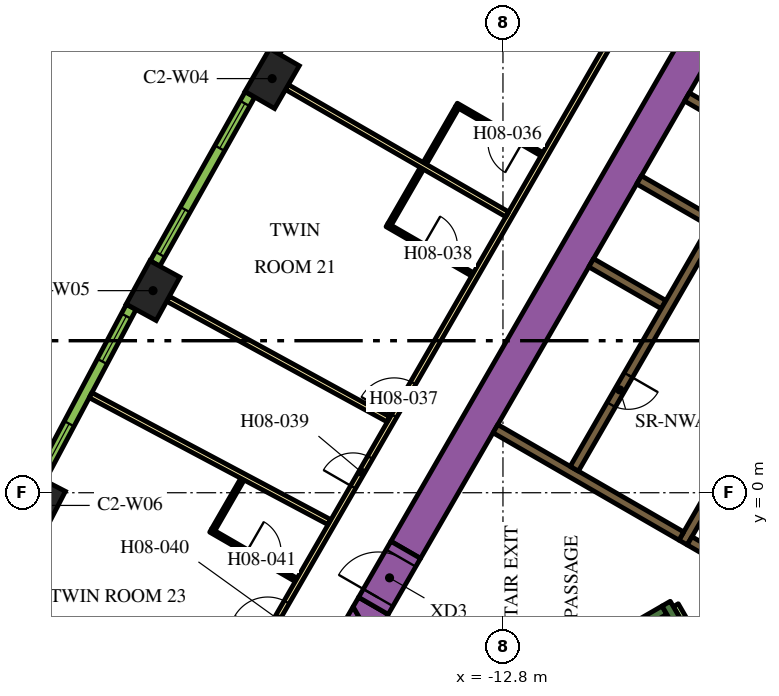
"""IFC4 building model, lengths in metres.
Left out: names, types, materials, properties, quantities, classifications, styles, units other than length and angle.
Written with IfcOpenShell. Run it as: python <this file> out.ifc"""

import sys

from ifc_helpers import new_model, si_unit, direction, frame, frame_2d, origin, origin_2d, place, context, subcontext, project, spatial, polyline, rectangle, outline, extrude, element, fill, save


model = new_model("IFC4")
c1 = context("Model", 3, precision=1e-05, world=origin(), true_north=direction((0.0, 1.0)))
c2 = subcontext(c1, "Body", "Model", "MODEL_VIEW")
j1 = project(units=[si_unit("LENGTHUNIT", "METRE"), si_unit("PLANEANGLEUNIT", "RADIAN")], contexts=[c1])
p1 = place(None, origin())
s1 = spatial("IfcSite", under=j1, at=p1, CompositionType="ELEMENT")
p2 = place(p1, origin())
s2 = spatial("IfcBuilding", under=s1, at=p2, CompositionType="ELEMENT")
p3 = place(p2, frame((0.0, 0.0, 111.0)))
s3 = spatial("IfcBuildingStorey", under=s2, at=p3, CompositionType="ELEMENT", Elevation=111.0)
for number, where, z_axis, x_axis in (
    (1, (-18.874, 10.897, 0.0), (0.0, 0.0, 1.0), (-0.5, -0.866, 0.0)),
    (2, (-22.009, 5.317, 0.0), (0.0, 0.0, 1.0), (-0.48, -0.877, 0.0)),
    (3, (-25.012, -0.334, 0.0), (0.0, 0.0, 1.0), (-0.459, -0.888, 0.0)),
):
    element("IfcColumn", number, at=place(p3, frame(where, z_axis=z_axis, x_axis=x_axis)), inside=s3, PredefinedType="COLUMN", context=c2, shape_type="SweptSolid", body=[
        extrude(rectangle(XDim=1.3, YDim=0.9, at=origin_2d()), origin(), (0.0, 0.0, 1.0), 3.9),
    ])
p4 = place(p3, frame((-15.36, -1.503, 0.0), z_axis=(0.0, 0.0, 1.0), x_axis=(0.50000389221, 0.866023156604, 0.0)))
e4 = element("IfcWall", 4, at=p4, inside=s3, PredefinedType="SOLIDWALL", context=c2, shape_type="SweptSolid", body=[
    extrude(rectangle(XDim=21.0, YDim=0.9, at=frame_2d((10.5, 0.0))), origin(), (0.0, 0.0, 1.0), 3.9),
])
p5 = place(p3, origin())
e5 = element("IfcWall", 5, at=p5, inside=s3, PredefinedType="SOLIDWALL", context=c2, shape_type="SweptSolid", body=[
    extrude(outline(polyline([(-16.489, -3.44), (-17.251, -3.88), (-16.743, -3.0), (-16.489, -3.44)])), origin(), (0.0, 0.0, 1.0), 3.9),
])
e6 = element("IfcWall", 6, at=p5, inside=s3, PredefinedType="SOLIDWALL", context=c2, shape_type="SweptSolid", body=[
    extrude(outline(polyline([(-15.82, -3.201), (-16.223, -3.9), (-16.743, -3.0), (-16.599, -2.751), (-15.82, -3.201)])), origin(), (0.0, 0.0, 1.0), 3.9),
])
p6 = place(p3, frame((-14.44, -6.49, 0.0), z_axis=(0.0, 0.0, 1.0), x_axis=(0.866022966069, 0.500004222222, 0.0)))
e7 = element("IfcWall", 7, at=p6, inside=s3, PredefinedType="SOLIDWALL", context=c2, shape_type="SweptSolid", body=[
    extrude(rectangle(XDim=6.8, YDim=0.25, at=frame_2d((3.4, 0.0))), origin(), (0.0, 0.0, 1.0), 3.9),
])
p7 = place(p3, frame((-8.168, -3.503, 0.0), z_axis=(0.0, 0.0, 1.0), x_axis=(-0.499952099219, 0.866053057547, 0.0)))
e8 = element("IfcWall", 8, at=p7, inside=s3, PredefinedType="SOLIDWALL", context=c2, shape_type="SweptSolid", body=[
    extrude(rectangle(XDim=0.675, YDim=0.25, at=frame_2d((0.337, 0.0))), origin(), (0.0, 0.0, 1.0), 3.9),
])
p8 = place(p3, frame((-8.06, -1.311, 0.0), z_axis=(0.0, 0.0, 1.0), x_axis=(0.50000273126, 0.866023826885, 0.0)))
e9 = element("IfcWall", 9, at=p8, inside=s3, PredefinedType="SOLIDWALL", context=c2, shape_type="SweptSolid", body=[
    extrude(rectangle(XDim=10.33, YDim=0.25, at=frame_2d((5.165, 0.0))), origin(), (0.0, 0.0, 1.0), 3.9),
])
e10 = element("IfcWall", 10, at=p5, inside=s3, PredefinedType="SOLIDWALL", context=c2, shape_type="SweptSolid", body=[
    extrude(outline(polyline([(-5.922, -2.257), (-5.922, -2.257), (-5.705, -2.382), (-5.83, -2.598), (-6.483, -2.221), (-6.591, -2.033), (-6.591, -2.033), (-6.7, -2.096), (-7.952, -1.373), (-7.827, -1.156), (-5.922, -2.257)])), origin(), (0.0, 0.0, 1.0), 3.9),
])
p9 = place(p3, frame((-8.106, -1.14, 0.0), z_axis=(0.0, 0.0, 1.0), x_axis=(-0.866000643155, 0.500042884217, 0.0)))
e11 = element("IfcWall", 11, at=p9, inside=s3, PredefinedType="SOLIDWALL", context=c2, shape_type="SweptSolid", body=[
    extrude(rectangle(XDim=5.65, YDim=0.25, at=frame_2d((2.825, 0.0))), origin(), (0.0, 0.0, 1.0), 3.9),
])
for number, where, z_axis, x_axis in (
    (12, (-8.574, 4.95, 0.0), (0.0, 0.0, 1.0), (-0.866, 0.5, 0.0)),
    (13, (-7.314, 7.132, 0.0), (0.0, 0.0, 1.0), (-0.866, 0.5, 0.0)),
):
    element("IfcWall", number, at=place(p3, frame(where, z_axis=z_axis, x_axis=x_axis)), inside=s3, PredefinedType="SOLIDWALL", context=c2, shape_type="SweptSolid", body=[
        extrude(rectangle(XDim=2.2, YDim=0.25, at=frame_2d((1.1, 0.0))), origin(), (0.0, 0.0, 1.0), 3.9),
    ])
p10 = place(p3, frame((-7.959, 10.415, 0.0), z_axis=(0.0, 0.0, 1.0), x_axis=(0.866020958405, -0.500007699544, 0.0)))
e14 = element("IfcWall", 14, at=p10, inside=s3, PredefinedType="SOLIDWALL", context=c2, shape_type="SweptSolid", body=[
    extrude(rectangle(XDim=4.1, YDim=0.25, at=frame_2d((2.05, 0.0))), origin(), (0.0, 0.0, 1.0), 3.9),
])
p11 = place(p3, frame((-8.252, -2.958, 0.0), z_axis=(0.0, 0.0, 1.0), x_axis=(0.500174715838, -0.865924508047, 0.0)))
e15 = element("IfcWall", 15, at=p11, inside=s3, PredefinedType="PARTITIONING", context=c2, shape_type="SweptSolid", body=[
    extrude(rectangle(XDim=0.514, YDim=0.15, at=frame_2d((0.257, 0.0))), origin(), (0.0, 0.0, 1.0), 2.75),
])
p12 = place(p3, frame((-6.008, 9.144, 0.0), z_axis=(0.0, 0.0, 1.0), x_axis=(-0.500006956611, -0.866021387346, 0.0)))
e16 = element("IfcWall", 16, at=p12, inside=s3, PredefinedType="SOLIDWALL", context=c2, shape_type="SweptSolid", body=[
    extrude(rectangle(XDim=9.83, YDim=0.25, at=frame_2d((4.915, 0.0))), origin(), (0.0, 0.0, 1.0), 3.9),
])
p13 = place(p12, frame((6.985, 0.0, 0.0)))
e17 = element("IfcOpeningElement", 17, at=p13, cuts=e16, PredefinedType="OPENING", context=c2, shape_type="SweptSolid", body=[
    extrude(rectangle(XDim=0.9, YDim=2.1, at=frame_2d((0.45, 1.05))), frame((0.0, 0.135, 0.0), z_axis=(0.0, -1.0, 0.0), x_axis=(1.0, 0.0, 0.0)), (0.0, 0.0, 1.0), 0.27),
])
p14 = place(p3, frame((-16.209, -2.976, 0.0), z_axis=(0.0, 0.0, 1.0), x_axis=(0.499954529098, 0.86605165483, 0.0)))
e18 = element("IfcWall", 18, at=p14, inside=s3, PredefinedType="SOLIDWALL", context=c2, shape_type="SweptSolid", body=[
    extrude(rectangle(XDim=1.7, YDim=0.9, at=frame_2d((0.85, 0.0))), origin(), (0.0, 0.0, 1.0), 3.9),
])
p15 = place(p14, frame((0.25, 0.0, 0.0)))
e19 = element("IfcOpeningElement", 19, at=p15, cuts=e18, PredefinedType="OPENING", context=c2, shape_type="SweptSolid", body=[
    extrude(rectangle(XDim=1.2, YDim=2.1, at=frame_2d((0.6, 1.05))), frame((0.0, 0.46, 0.0), z_axis=(0.0, -1.0, 0.0), x_axis=(1.0, 0.0, 0.0)), (0.0, 0.0, 1.0), 0.92),
])
p16 = place(p3, frame((-19.081, -3.9, 0.0), z_axis=(0.0, 0.0, 1.0), x_axis=(0.499998313975, 0.866026377209, 0.0)))
e20 = element("IfcWall", 20, at=p16, inside=s3, PredefinedType="PARTITIONING", context=c2, shape_type="SweptSolid", body=[
    extrude(rectangle(XDim=25.766, YDim=0.15, at=frame_2d((12.883, 0.0))), origin(), (0.0, 0.0, 1.0), 2.75),
])
p17 = place(p16, frame((19.306, 0.0, 0.0)))
e21 = element("IfcOpeningElement", 21, at=p17, cuts=e20, PredefinedType="OPENING", context=c2, shape_type="SweptSolid", body=[
    extrude(rectangle(XDim=1.0, YDim=2.1, at=frame_2d((0.5, 1.05))), frame((0.0, 0.085, 0.0), z_axis=(0.0, -1.0, 0.0), x_axis=(1.0, 0.0, 0.0)), (0.0, 0.0, 1.0), 0.17),
])
p18 = place(p16, frame((18.0, 0.0, 0.0)))
e22 = element("IfcOpeningElement", 22, at=p18, cuts=e20, PredefinedType="OPENING", context=c2, shape_type="SweptSolid", body=[
    extrude(rectangle(XDim=1.0, YDim=2.1, at=frame_2d((0.5, 1.05))), frame((0.0, 0.085, 0.0), z_axis=(0.0, -1.0, 0.0), x_axis=(1.0, 0.0, 0.0)), (0.0, 0.0, 1.0), 0.17),
])
p19 = place(p16, frame((6.838, 0.0, 0.0)))
e23 = element("IfcOpeningElement", 23, at=p19, cuts=e20, PredefinedType="OPENING", context=c2, shape_type="SweptSolid", body=[
    extrude(rectangle(XDim=1.0, YDim=2.1, at=frame_2d((0.5, 1.05))), frame((0.0, 0.085, 0.0), z_axis=(0.0, -1.0, 0.0), x_axis=(1.0, 0.0, 0.0)), (0.0, 0.0, 1.0), 0.17),
])
p20 = place(p16, frame((4.674, 0.0, 0.0)))
e24 = element("IfcOpeningElement", 24, at=p20, cuts=e20, PredefinedType="OPENING", context=c2, shape_type="SweptSolid", body=[
    extrude(rectangle(XDim=0.9, YDim=2.1, at=frame_2d((0.45, 1.05))), frame((0.0, 0.085, 0.0), z_axis=(0.0, -1.0, 0.0), x_axis=(1.0, 0.0, 0.0)), (0.0, 0.0, 1.0), 0.17),
])
p21 = place(p16, frame((0.18, 0.0, 0.0)))
e25 = element("IfcOpeningElement", 25, at=p21, cuts=e20, PredefinedType="OPENING", context=c2, shape_type="SweptSolid", body=[
    extrude(rectangle(XDim=1.0, YDim=2.1, at=frame_2d((0.5, 1.05))), frame((0.0, 0.085, 0.0), z_axis=(0.0, -1.0, 0.0), x_axis=(1.0, 0.0, 0.0)), (0.0, 0.0, 1.0), 0.17),
])
p22 = place(p3, frame((-23.652, 2.567, 0.0), z_axis=(0.0, 0.0, 1.0), x_axis=(0.883019237957, -0.469336793144, 0.0)))
e26 = element("IfcWall", 26, at=p22, inside=s3, PredefinedType="PARTITIONING", context=c2, shape_type="SweptSolid", body=[
    extrude(rectangle(XDim=7.111, YDim=0.15, at=frame_2d((3.555, 0.0))), origin(), (0.0, 0.0, 1.0), 2.75),
])
p23 = place(p3, frame((-26.591, -3.122, 0.0), z_axis=(0.0, 0.0, 1.0), x_axis=(0.893766213273, -0.448533115847, 0.0)))
e27 = element("IfcWall", 27, at=p23, inside=s3, PredefinedType="PARTITIONING", context=c2, shape_type="SweptSolid", body=[
    extrude(rectangle(XDim=10.875, YDim=0.15, at=frame_2d((5.438, 0.0))), origin(), (0.0, 0.0, 1.0), 2.75),
])
p24 = place(p3, frame((-21.614, 5.102, 0.0), z_axis=(0.0, 0.0, 1.0), x_axis=(0.877484555087, -0.479604895287, 0.0)))
e28 = element("IfcWall", 28, at=p24, inside=s3, PredefinedType="PARTITIONING", context=c2, shape_type="SweptSolid", body=[
    extrude(rectangle(XDim=6.611, YDim=0.15, at=frame_2d((3.306, 0.0))), origin(), (0.0, 0.0, 1.0), 2.75),
])
p25 = place(p3, frame((-18.484, 10.672, 0.0), z_axis=(0.0, 0.0, 1.0), x_axis=(0.866019162053, -0.50001081084, 0.0)))
e29 = element("IfcWall", 29, at=p25, inside=s3, PredefinedType="PARTITIONING", context=c2, shape_type="SweptSolid", body=[
    extrude(rectangle(XDim=6.694, YDim=0.15, at=frame_2d((3.347, 0.0))), origin(), (0.0, 0.0, 1.0), 2.75),
])
p26 = place(p3, frame((-11.774, 8.906, 0.0), z_axis=(0.0, 0.0, 1.0), x_axis=(-0.865997922154, 0.500047596559, 0.0)))
e30 = element("IfcWall", 30, at=p26, inside=s3, PredefinedType="PARTITIONING", context=c2, shape_type="SweptSolid", body=[
    extrude(rectangle(XDim=2.6, YDim=0.1, at=frame_2d((1.3, 0.0))), origin(), (0.0, 0.0, 1.0), 2.75),
])
p27 = place(p26, frame((0.6, 0.0, 0.0)))
e31 = element("IfcOpeningElement", 31, at=p27, cuts=e30, PredefinedType="OPENING", context=c2, shape_type="SweptSolid", body=[
    extrude(rectangle(XDim=0.9, YDim=2.1, at=frame_2d((0.45, 1.05))), frame((0.0, 0.06, 0.0), z_axis=(0.0, -1.0, 0.0), x_axis=(1.0, 0.0, 0.0)), (0.0, 0.0, 1.0), 0.12),
])
p28 = place(p3, frame((-14.008, 10.138, 0.0), z_axis=(0.0, 0.0, 1.0), x_axis=(-0.499892348375, -0.866087547558, 0.0)))
e32 = element("IfcWall", 32, at=p28, inside=s3, PredefinedType="PARTITIONING", context=c2, shape_type="SweptSolid", body=[
    extrude(rectangle(XDim=1.7, YDim=0.1, at=frame_2d((0.85, 0.0))), origin(), (0.0, 0.0, 1.0), 2.75),
])
p29 = place(p3, frame((-15.852, 7.044, 0.0), z_axis=(0.0, 0.0, 1.0), x_axis=(0.866021400173, -0.500006934395, 0.0)))
e33 = element("IfcWall", 33, at=p29, inside=s3, PredefinedType="PARTITIONING", context=c2, shape_type="SweptSolid", body=[
    extrude(rectangle(XDim=2.6, YDim=0.1, at=frame_2d((1.3, 0.0))), origin(), (0.0, 0.0, 1.0), 2.75),
])
p30 = place(p29, frame((1.1, 0.0, 0.0)))
e34 = element("IfcOpeningElement", 34, at=p30, cuts=e33, PredefinedType="OPENING", context=c2, shape_type="SweptSolid", body=[
    extrude(rectangle(XDim=0.9, YDim=2.1, at=frame_2d((0.45, 1.05))), frame((0.0, 0.06, 0.0), z_axis=(0.0, -1.0, 0.0), x_axis=(1.0, 0.0, 0.0)), (0.0, 0.0, 1.0), 0.12),
])
p31 = place(p3, frame((-15.783, 7.062, 0.0), z_axis=(0.0, 0.0, 1.0), x_axis=(0.499954529098, 0.86605165483, 0.0)))
e35 = element("IfcWall", 35, at=p31, inside=s3, PredefinedType="PARTITIONING", context=c2, shape_type="SweptSolid", body=[
    extrude(rectangle(XDim=1.7, YDim=0.1, at=frame_2d((0.85, 0.0))), origin(), (0.0, 0.0, 1.0), 2.75),
])
p32 = place(p3, frame((-20.492, -0.994, 0.0), z_axis=(0.0, 0.0, 1.0), x_axis=(0.865997922154, -0.500047596559, 0.0)))
e36 = element("IfcWall", 36, at=p32, inside=s3, PredefinedType="PARTITIONING", context=c2, shape_type="SweptSolid", body=[
    extrude(rectangle(XDim=2.6, YDim=0.1, at=frame_2d((1.3, 0.0))), origin(), (0.0, 0.0, 1.0), 2.75),
])
p33 = place(p32, frame((1.1, 0.0, 0.0)))
e37 = element("IfcOpeningElement", 37, at=p33, cuts=e36, PredefinedType="OPENING", context=c2, shape_type="SweptSolid", body=[
    extrude(rectangle(XDim=0.9, YDim=2.1, at=frame_2d((0.45, 1.05))), frame((0.0, 0.06, 0.0), z_axis=(0.0, -1.0, 0.0), x_axis=(1.0, 0.0, 0.0)), (0.0, 0.0, 1.0), 0.12),
])
p34 = place(p3, frame((-20.424, -0.976, 0.0), z_axis=(0.0, 0.0, 1.0), x_axis=(0.500086174919, 0.865975644955, 0.0)))
e38 = element("IfcWall", 38, at=p34, inside=s3, PredefinedType="PARTITIONING", context=c2, shape_type="SweptSolid", body=[
    extrude(rectangle(XDim=1.53, YDim=0.1, at=frame_2d((0.765, 0.0))), origin(), (0.0, 0.0, 1.0), 2.75),
])
p35 = place(p3, frame((-16.203, 15.998, 0.0), z_axis=(0.0, 0.0, 1.0), x_axis=(-0.510054281659, -0.860142214847, 0.0)))
e39 = element("IfcWall", 39, at=p35, inside=s3, PredefinedType="SOLIDWALL", context=c2, shape_type="SweptSolid", body=[
    extrude(rectangle(XDim=5.101, YDim=0.29, at=frame_2d((2.55, 0.0))), origin(), (0.0, 0.0, 1.0), 3.65),
])
p36 = place(p35, frame((0.273, 0.0, 0.9)))
e40 = element("IfcOpeningElement", 40, at=p36, cuts=e39, PredefinedType="OPENING", context=c2, shape_type="SweptSolid", body=[
    extrude(rectangle(XDim=1.35, YDim=2.15, at=frame_2d((0.675, 1.075))), frame((0.0, 0.155, 0.0), z_axis=(0.0, -1.0, 0.0), x_axis=(1.0, 0.0, 0.0)), (0.0, 0.0, 1.0), 0.31),
])
p37 = place(p35, frame((3.478, 0.0, 0.9)))
e41 = element("IfcOpeningElement", 41, at=p37, cuts=e39, PredefinedType="OPENING", context=c2, shape_type="SweptSolid", body=[
    extrude(rectangle(XDim=1.35, YDim=2.15, at=frame_2d((0.675, 1.075))), frame((0.0, 0.155, 0.0), z_axis=(0.0, -1.0, 0.0), x_axis=(1.0, 0.0, 0.0)), (0.0, 0.0, 1.0), 0.31),
])
p38 = place(p3, frame((-19.458, 10.48, 0.0), z_axis=(0.0, 0.0, 1.0), x_axis=(-0.48983164787, -0.87181704316, 0.0)))
e42 = element("IfcWall", 42, at=p38, inside=s3, PredefinedType="SOLIDWALL", context=c2, shape_type="SweptSolid", body=[
    extrude(rectangle(XDim=5.1, YDim=0.29, at=frame_2d((2.55, 0.0))), origin(), (0.0, 0.0, 1.0), 3.65),
])
p39 = place(p38, frame((0.272, 0.0, 0.9)))
e43 = element("IfcOpeningElement", 43, at=p39, cuts=e42, PredefinedType="OPENING", context=c2, shape_type="SweptSolid", body=[
    extrude(rectangle(XDim=1.35, YDim=2.15, at=frame_2d((0.675, 1.075))), frame((0.0, 0.155, 0.0), z_axis=(0.0, -1.0, 0.0), x_axis=(1.0, 0.0, 0.0)), (0.0, 0.0, 1.0), 0.31),
])
p40 = place(p38, frame((3.478, 0.0, 0.9)))
e44 = element("IfcOpeningElement", 44, at=p40, cuts=e42, PredefinedType="OPENING", context=c2, shape_type="SweptSolid", body=[
    extrude(rectangle(XDim=1.35, YDim=2.15, at=frame_2d((0.675, 1.075))), frame((0.0, 0.155, 0.0), z_axis=(0.0, -1.0, 0.0), x_axis=(1.0, 0.0, 0.0)), (0.0, 0.0, 1.0), 0.31),
])
p41 = place(p3, frame((-22.583, 4.887, 0.0), z_axis=(0.0, 0.0, 1.0), x_axis=(-0.469323203119, -0.883026461106, 0.0)))
e45 = element("IfcWall", 45, at=p41, inside=s3, PredefinedType="SOLIDWALL", context=c2, shape_type="SweptSolid", body=[
    extrude(rectangle(XDim=5.101, YDim=0.29, at=frame_2d((2.55, 0.0))), origin(), (0.0, 0.0, 1.0), 3.65),
])
p42 = place(p41, frame((0.273, 0.0, 0.9)))
e46 = element("IfcOpeningElement", 46, at=p42, cuts=e45, PredefinedType="OPENING", context=c2, shape_type="SweptSolid", body=[
    extrude(rectangle(XDim=1.35, YDim=2.15, at=frame_2d((0.675, 1.075))), frame((0.0, 0.155, 0.0), z_axis=(0.0, -1.0, 0.0), x_axis=(1.0, 0.0, 0.0)), (0.0, 0.0, 1.0), 0.31),
])
p43 = place(p41, frame((3.478, 0.0, 0.9)))
e47 = element("IfcOpeningElement", 47, at=p43, cuts=e45, PredefinedType="OPENING", context=c2, shape_type="SweptSolid", body=[
    extrude(rectangle(XDim=1.35, YDim=2.15, at=frame_2d((0.675, 1.075))), frame((0.0, 0.155, 0.0), z_axis=(0.0, -1.0, 0.0), x_axis=(1.0, 0.0, 0.0)), (0.0, 0.0, 1.0), 0.31),
])
p44 = place(p13, origin())
e48 = element("IfcDoor", 48, at=p44, inside=s3, OperationType="SINGLE_SWING_LEFT", PredefinedType="DOOR", context=c2, shape_type="SweptSolid", body=[
    extrude(rectangle(XDim=0.9, YDim=2.1, at=frame_2d((0.45, 1.05))), frame((0.0, 0.025, 0.0), z_axis=(0.0, -1.0, 0.0), x_axis=(1.0, 0.0, 0.0)), (0.0, 0.0, 1.0), 0.05),
])
fill(e17, e48)
p45 = place(p15, origin())
e49 = element("IfcDoor", 49, at=p45, inside=s3, OperationType="SINGLE_SWING_LEFT", PredefinedType="DOOR", context=c2, shape_type="SweptSolid", body=[
    extrude(rectangle(XDim=1.2, YDim=2.1, at=frame_2d((0.6, 1.05))), frame((0.0, 0.025, 0.0), z_axis=(0.0, -1.0, 0.0), x_axis=(1.0, 0.0, 0.0)), (0.0, 0.0, 1.0), 0.05),
])
fill(e19, e49)
p46 = place(p27, origin())
e50 = element("IfcDoor", 50, at=p46, inside=s3, OperationType="SINGLE_SWING_LEFT", PredefinedType="DOOR", context=c2, shape_type="SweptSolid", body=[
    extrude(rectangle(XDim=0.9, YDim=2.1, at=frame_2d((0.45, 1.05))), frame((0.0, 0.025, 0.0), z_axis=(0.0, -1.0, 0.0), x_axis=(1.0, 0.0, 0.0)), (0.0, 0.0, 1.0), 0.05),
])
fill(e31, e50)
p47 = place(p19, origin())
e51 = element("IfcDoor", 51, at=p47, inside=s3, OperationType="SINGLE_SWING_LEFT", PredefinedType="DOOR", context=c2, shape_type="SweptSolid", body=[
    extrude(rectangle(XDim=1.0, YDim=2.1, at=frame_2d((0.5, 1.05))), frame((0.0, 0.025, 0.0), z_axis=(0.0, -1.0, 0.0), x_axis=(1.0, 0.0, 0.0)), (0.0, 0.0, 1.0), 0.05),
])
fill(e23, e51)
p48 = place(p30, origin())
e52 = element("IfcDoor", 52, at=p48, inside=s3, OperationType="SINGLE_SWING_RIGHT", PredefinedType="DOOR", context=c2, shape_type="SweptSolid", body=[
    extrude(rectangle(XDim=0.9, YDim=2.1, at=frame_2d((0.45, 1.05))), frame((0.0, 0.025, 0.0), z_axis=(0.0, -1.0, 0.0), x_axis=(1.0, 0.0, 0.0)), (0.0, 0.0, 1.0), 0.05),
])
fill(e34, e52)
p49 = place(p20, origin())
e53 = element("IfcDoor", 53, at=p49, inside=s3, OperationType="SINGLE_SWING_RIGHT", PredefinedType="DOOR", context=c2, shape_type="SweptSolid", body=[
    extrude(rectangle(XDim=0.9, YDim=2.1, at=frame_2d((0.45, 1.05))), frame((0.0, 0.025, 0.0), z_axis=(0.0, -1.0, 0.0), x_axis=(1.0, 0.0, 0.0)), (0.0, 0.0, 1.0), 0.05),
])
fill(e24, e53)
p50 = place(p21, origin())
e54 = element("IfcDoor", 54, at=p50, inside=s3, OperationType="SINGLE_SWING_LEFT", PredefinedType="DOOR", context=c2, shape_type="SweptSolid", body=[
    extrude(rectangle(XDim=1.0, YDim=2.1, at=frame_2d((0.5, 1.05))), frame((0.0, 0.025, 0.0), z_axis=(0.0, -1.0, 0.0), x_axis=(1.0, 0.0, 0.0)), (0.0, 0.0, 1.0), 0.05),
])
fill(e25, e54)
p51 = place(p33, origin())
e55 = element("IfcDoor", 55, at=p51, inside=s3, OperationType="SINGLE_SWING_LEFT", PredefinedType="DOOR", context=c2, shape_type="SweptSolid", body=[
    extrude(rectangle(XDim=0.9, YDim=2.1, at=frame_2d((0.45, 1.05))), frame((0.0, 0.025, 0.0), z_axis=(0.0, -1.0, 0.0), x_axis=(1.0, 0.0, 0.0)), (0.0, 0.0, 1.0), 0.05),
])
fill(e37, e55)
p52 = place(p39, origin())
e56 = element("IfcWindow", 56, at=p52, inside=s3, PartitioningType="DOUBLE_PANEL_VERTICAL", PredefinedType="WINDOW", context=c2, shape_type="SweptSolid", body=[
    extrude(rectangle(XDim=1.35, YDim=2.15, at=frame_2d((0.675, 1.075))), frame((0.0, 0.015, 0.0), z_axis=(0.0, -1.0, 0.0), x_axis=(1.0, 0.0, 0.0)), (0.0, 0.0, 1.0), 0.06),
])
fill(e43, e56)
p53 = place(p40, origin())
e57 = element("IfcWindow", 57, at=p53, inside=s3, PartitioningType="DOUBLE_PANEL_VERTICAL", PredefinedType="WINDOW", context=c2, shape_type="SweptSolid", body=[
    extrude(rectangle(XDim=1.35, YDim=2.15, at=frame_2d((0.675, 1.075))), frame((0.0, 0.015, 0.0), z_axis=(0.0, -1.0, 0.0), x_axis=(1.0, 0.0, 0.0)), (0.0, 0.0, 1.0), 0.06),
])
fill(e44, e57)
p54 = place(p42, origin())
e58 = element("IfcWindow", 58, at=p54, inside=s3, PartitioningType="DOUBLE_PANEL_VERTICAL", PredefinedType="WINDOW", context=c2, shape_type="SweptSolid", body=[
    extrude(rectangle(XDim=1.35, YDim=2.15, at=frame_2d((0.675, 1.075))), frame((0.0, 0.015, 0.0), z_axis=(0.0, -1.0, 0.0), x_axis=(1.0, 0.0, 0.0)), (0.0, 0.0, 1.0), 0.06),
])
fill(e46, e58)
p55 = place(p43, origin())
e59 = element("IfcWindow", 59, at=p55, inside=s3, PartitioningType="DOUBLE_PANEL_VERTICAL", PredefinedType="WINDOW", context=c2, shape_type="SweptSolid", body=[
    extrude(rectangle(XDim=1.35, YDim=2.15, at=frame_2d((0.675, 1.075))), frame((0.0, 0.015, 0.0), z_axis=(0.0, -1.0, 0.0), x_axis=(1.0, 0.0, 0.0)), (0.0, 0.0, 1.0), 0.06),
])
fill(e47, e59)
save(model, sys.argv[1])
